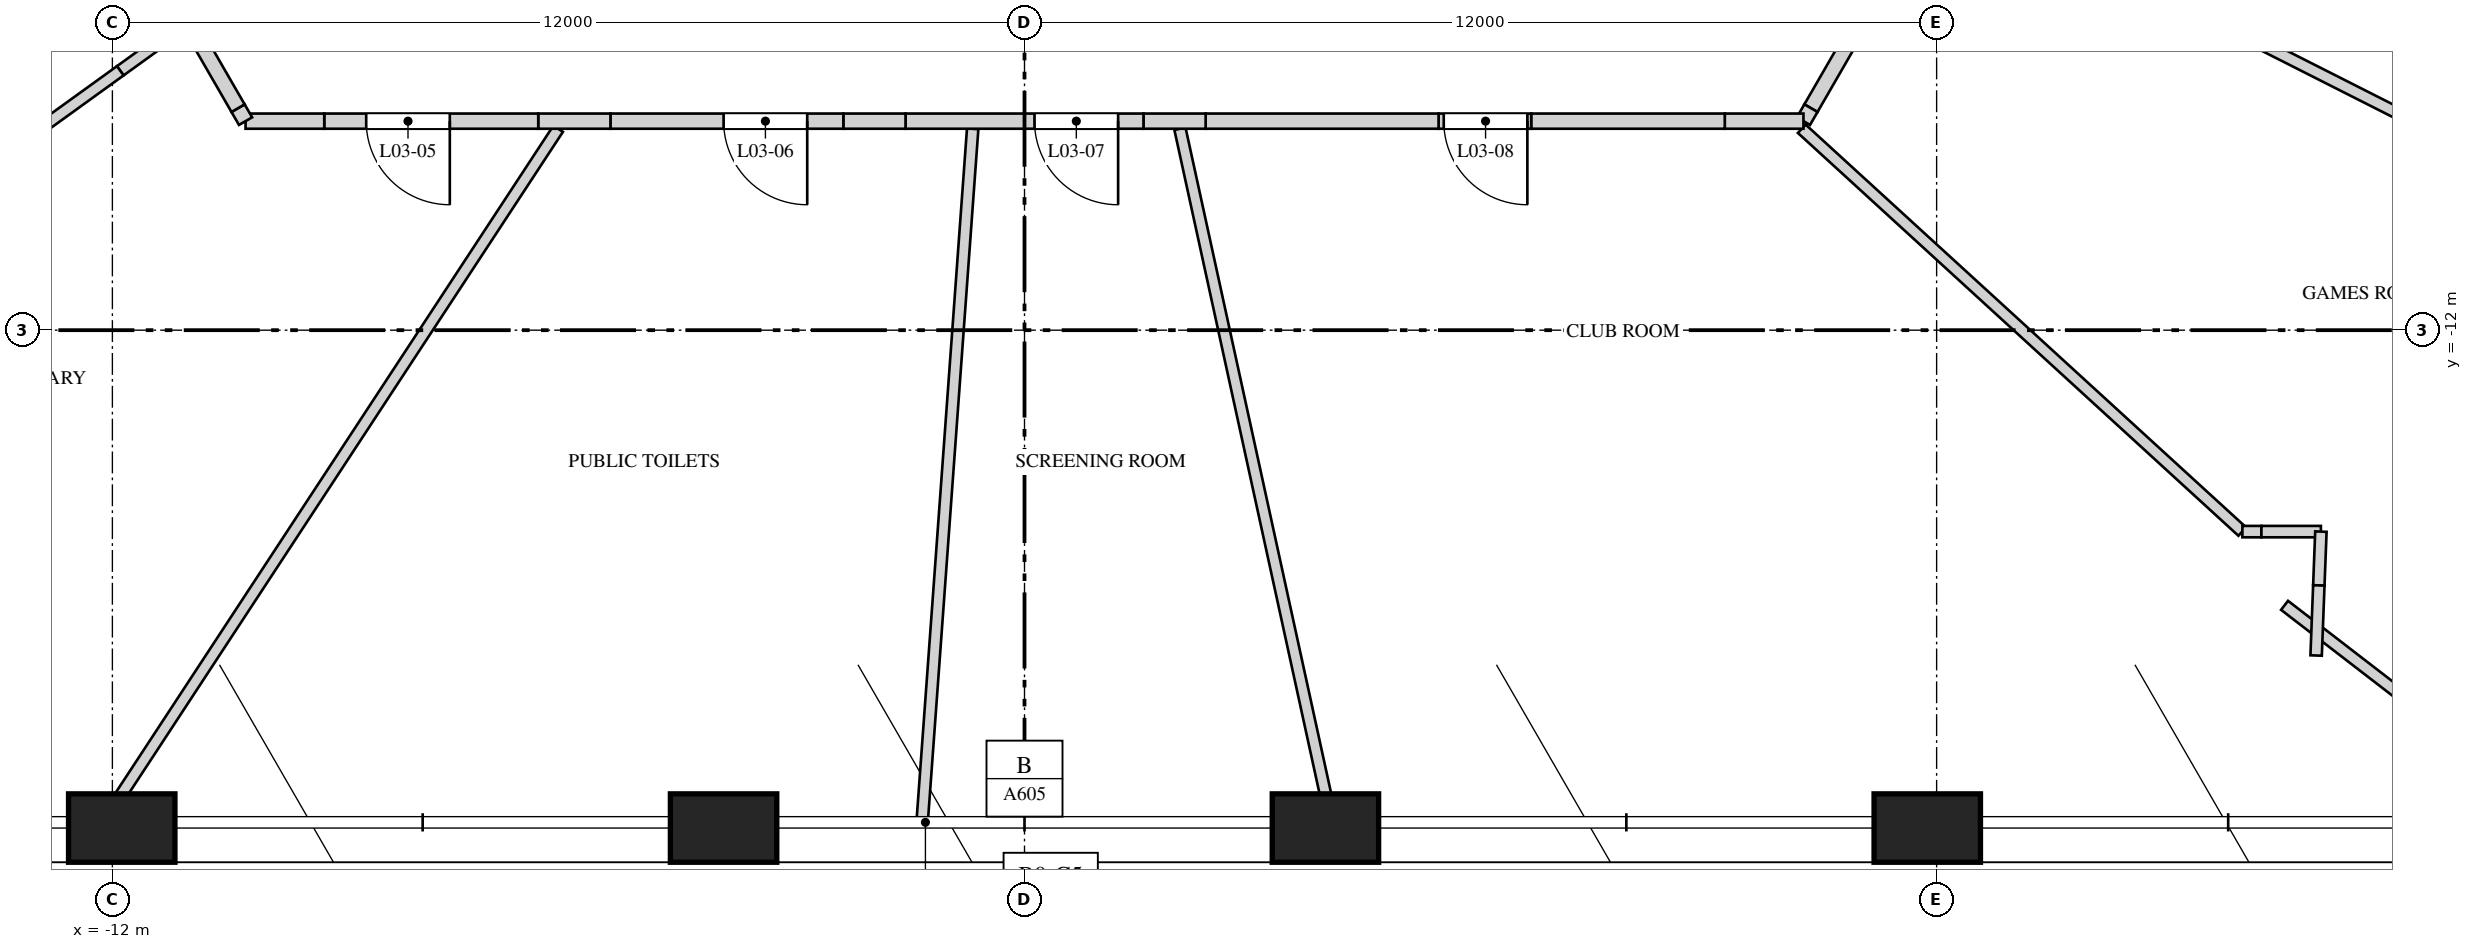
"""IFC4 building model, lengths in metres.
Left out: names, types, materials, properties, quantities, classifications, styles, units other than length and angle.
Written with IfcOpenShell. Run it as: python <this file> out.ifc"""

import sys

from ifc_helpers import new_model, si_unit, direction, frame, frame_2d, origin, origin_2d, place, context, subcontext, project, spatial, polyline, rectangle, outline, extrude, element, fill, save


model = new_model("IFC4")
c1 = context("Model", 3, precision=1e-05, world=origin(), true_north=direction((0.0, 1.0)))
c2 = subcontext(c1, "Body", "Model", "MODEL_VIEW")
j1 = project(units=[si_unit("LENGTHUNIT", "METRE"), si_unit("PLANEANGLEUNIT", "RADIAN")], contexts=[c1])
p1 = place(None, origin())
s1 = spatial("IfcSite", under=j1, at=p1, CompositionType="ELEMENT")
p2 = place(p1, origin())
s2 = spatial("IfcBuilding", under=s1, at=p2, CompositionType="ELEMENT")
p3 = place(p2, frame((0.0, 0.0, 20.0)))
s3 = spatial("IfcBuildingStorey", under=s2, at=p3, CompositionType="ELEMENT", Elevation=20.0)
for number, where, z_axis, x_axis in (
    (1, (-11.877, -18.55, 0.0), (0.0, 0.0, 1.0), (1.0, 0.0, 0.0)),
    (2, (-3.959, -18.55, 0.0), (0.0, 0.0, 1.0), (1.0, 0.0, 0.0)),
    (3, (3.959, -18.55, 0.0), (0.0, 0.0, 1.0), (1.0, 0.0, 0.0)),
    (4, (11.877, -18.55, 0.0), (0.0, 0.0, 1.0), (1.0, 0.0, 0.0)),
):
    element("IfcColumn", number, at=place(p3, frame(where, z_axis=z_axis, x_axis=x_axis)), inside=s3, PredefinedType="COLUMN", context=c2, shape_type="SweptSolid", body=[
        extrude(rectangle(XDim=1.4, YDim=0.9, at=origin_2d()), origin(), (0.0, 0.0, 1.0), 5.0),
    ])
p4 = place(p3, frame((-11.084, -8.001, 0.0), z_axis=(0.0, 0.0, 1.0), x_axis=(-0.810724232581, -0.585428235316, 0.0)))
e5 = element("IfcWall", 5, at=p4, inside=s3, PredefinedType="PARTITIONING", context=c2, shape_type="SweptSolid", body=[
    extrude(rectangle(XDim=1.001, YDim=0.15, at=frame_2d((0.5, 0.0))), origin(), (0.0, 0.0, 1.0), 3.55),
])
p5 = place(p3, frame((-11.896, -8.588, 0.0), z_axis=(0.0, 0.0, 1.0), x_axis=(-0.810816646236, -0.585300235936, 0.0)))
e6 = element("IfcWall", 6, at=p5, inside=s3, PredefinedType="PARTITIONING", context=c2, shape_type="SweptSolid", body=[
    extrude(rectangle(XDim=16.816, YDim=0.15, at=frame_2d((8.408, 0.0))), origin(), (0.0, 0.0, 1.0), 4.65),
])
p6 = place(p3, frame((-6.135, -9.35, 0.0), z_axis=(0.0, 0.0, 1.0), x_axis=(-0.548631398355, -0.836064344856, 0.0)))
e7 = element("IfcWall", 7, at=p6, inside=s3, PredefinedType="PARTITIONING", context=c2, shape_type="SweptSolid", body=[
    extrude(rectangle(XDim=10.86, YDim=0.15, at=frame_2d((5.43, 0.0))), origin(), (0.0, 0.0, 1.0), 3.75),
])
p7 = place(p3, frame((-0.682, -9.35, 0.0), z_axis=(0.0, 0.0, 1.0), x_axis=(-0.072727761096, -0.997351829981, 0.0)))
e8 = element("IfcWall", 8, at=p7, inside=s3, PredefinedType="PARTITIONING", context=c2, shape_type="SweptSolid", body=[
    extrude(rectangle(XDim=9.104, YDim=0.15, at=frame_2d((4.552, 0.0))), origin(), (0.0, 0.0, 1.0), 4.65),
])
p8 = place(p3, frame((2.045, -9.35, 0.0), z_axis=(0.0, 0.0, 1.0), x_axis=(0.213683561591, -0.976902930442, 0.0)))
e9 = element("IfcWall", 9, at=p8, inside=s3, PredefinedType="PARTITIONING", context=c2, shape_type="SweptSolid", body=[
    extrude(rectangle(XDim=9.294, YDim=0.15, at=frame_2d((4.647, 0.0))), origin(), (0.0, 0.0, 1.0), 3.75),
])
p9 = place(p3, frame((10.226, -9.35, 0.0), z_axis=(0.0, 0.0, 1.0), x_axis=(0.738001386372, -0.674799195104, 0.0)))
e10 = element("IfcWall", 10, at=p9, inside=s3, PredefinedType="PARTITIONING", context=c2, shape_type="SweptSolid", body=[
    extrude(rectangle(XDim=7.853, YDim=0.15, at=frame_2d((3.927, 0.0))), origin(), (0.0, 0.0, 1.0), 3.55),
])
p10 = place(p3, frame((12.152, -6.152, 0.0), z_axis=(0.0, 0.0, 1.0), x_axis=(0.892189195248, -0.451661864542, 0.0)))
e11 = element("IfcWall", 11, at=p10, inside=s3, PredefinedType="PARTITIONING", context=c2, shape_type="SweptSolid", body=[
    extrude(rectangle(XDim=12.323, YDim=0.15, at=frame_2d((6.161, 0.0))), origin(), (0.0, 0.0, 1.0), 3.55),
])
p11 = place(p3, frame((16.023, -14.65, 0.0), z_axis=(0.0, 0.0, 1.0), x_axis=(1.0, 0.0, 0.0)))
e12 = element("IfcWall", 12, at=p11, inside=s3, PredefinedType="PARTITIONING", context=c2, shape_type="SweptSolid", body=[
    extrude(rectangle(XDim=0.25, YDim=0.15, at=frame_2d((0.125, 0.0))), origin(), (0.0, 0.0, 1.0), 3.55),
])
p12 = place(p3, frame((16.273, -14.65, 0.0), z_axis=(0.0, 0.0, 1.0), x_axis=(1.0, 0.0, 0.0)))
e13 = element("IfcWall", 13, at=p12, inside=s3, PredefinedType="PARTITIONING", context=c2, shape_type="SweptSolid", body=[
    extrude(rectangle(XDim=0.782, YDim=0.15, at=frame_2d((0.391, 0.0))), origin(), (0.0, 0.0, 1.0), 4.65),
])
p13 = place(p3, frame((16.577, -15.62, 0.0), z_axis=(0.0, 0.0, 1.0), x_axis=(0.79203798149, -0.610471814155, 0.0)))
e14 = element("IfcWall", 14, at=p13, inside=s3, PredefinedType="PARTITIONING", context=c2, shape_type="SweptSolid", body=[
    extrude(rectangle(XDim=4.603, YDim=0.15, at=frame_2d((2.301, 0.0))), origin(), (0.0, 0.0, 1.0), 3.55),
])
p14 = place(p3, frame((17.056, -14.65, 0.0), z_axis=(0.0, 0.0, 1.0), x_axis=(-0.038605211655, -0.999254540962, 0.0)))
e15 = element("IfcWall", 15, at=p14, inside=s3, PredefinedType="PARTITIONING", context=c2, shape_type="SweptSolid", body=[
    extrude(rectangle(XDim=0.708, YDim=0.15, at=frame_2d((0.354, 0.0))), origin(), (0.0, 0.0, 1.0), 4.65),
])
p15 = place(p3, frame((17.028, -15.358, 0.0), z_axis=(0.0, 0.0, 1.0), x_axis=(-0.038361998043, -0.999263907637, 0.0)))
e16 = element("IfcWall", 16, at=p15, inside=s3, PredefinedType="PARTITIONING", context=c2, shape_type="SweptSolid", body=[
    extrude(rectangle(XDim=0.923, YDim=0.15, at=frame_2d((0.461, 0.0))), origin(), (0.0, 0.0, 1.0), 3.55),
])
p16 = place(p3, frame((10.897, -8.125, 0.0), z_axis=(0.0, 0.0, 1.0), x_axis=(-0.499978356969, -0.866037899034, 0.0)))
e17 = element("IfcWall", 17, at=p16, inside=s3, PredefinedType="SOLIDWALL", context=c2, shape_type="SweptSolid", body=[
    extrude(rectangle(XDim=1.101, YDim=0.2, at=frame_2d((0.551, 0.0))), origin(), (0.0, 0.0, 1.0), 4.65),
])
p17 = place(p3, frame((10.347, -9.079, 0.0), z_axis=(0.0, 0.0, 1.0), x_axis=(-0.499865263774, -0.866103179807, 0.0)))
e18 = element("IfcWall", 18, at=p17, inside=s3, PredefinedType="SOLIDWALL", context=c2, shape_type="SweptSolid", body=[
    extrude(rectangle(XDim=0.197, YDim=0.2, at=frame_2d((0.099, 0.0))), origin(), (0.0, 0.0, 1.0), 3.55),
])
p18 = place(p3, frame((10.248, -9.25, 0.0), z_axis=(0.0, 0.0, 1.0), x_axis=(-1.0, 0.0, 0.0)))
e19 = element("IfcWall", 19, at=p18, inside=s3, PredefinedType="SOLIDWALL", context=c2, shape_type="SweptSolid", body=[
    extrude(rectangle(XDim=1.035, YDim=0.2, at=frame_2d((0.518, 0.0))), origin(), (0.0, 0.0, 1.0), 3.55),
])
p19 = place(p3, frame((9.213, -9.25, 0.0), z_axis=(0.0, 0.0, 1.0), x_axis=(-1.0, 0.0, 0.0)))
e20 = element("IfcWall", 20, at=p19, inside=s3, PredefinedType="SOLIDWALL", context=c2, shape_type="SweptSolid", body=[
    extrude(rectangle(XDim=2.547, YDim=0.2, at=frame_2d((1.273, 0.0))), origin(), (0.0, 0.0, 1.0), 4.65),
])
p20 = place(p3, frame((6.666, -9.25, 0.0), z_axis=(0.0, 0.0, 1.0), x_axis=(-1.0, 0.0, 0.0)))
e21 = element("IfcWall", 21, at=p20, inside=s3, PredefinedType="SOLIDWALL", context=c2, shape_type="SweptSolid", body=[
    extrude(outline(polyline([(0.0, 0.0), (1.218, 0.0), (1.218, 3.75), (0.268, 3.75), (0.268, 4.65), (0.0, 4.65), (0.0, 0.0)])), frame((0.0, 0.1, 0.0), z_axis=(0.0, -1.0, 0.0), x_axis=(1.0, 0.0, 0.0)), (0.0, 0.0, 1.0), 0.2),
])
p21 = place(p20, frame((0.05, 0.0, 0.0)))
e22 = element("IfcOpeningElement", 22, at=p21, cuts=e21, PredefinedType="OPENING", context=c2, shape_type="SweptSolid", body=[
    extrude(rectangle(XDim=1.1, YDim=2.4, at=frame_2d((0.55, 1.2))), frame((0.0, 0.11, 0.0), z_axis=(0.0, -1.0, 0.0), x_axis=(1.0, 0.0, 0.0)), (0.0, 0.0, 1.0), 0.22),
])
p22 = place(p3, frame((5.448, -9.25, 0.0), z_axis=(0.0, 0.0, 1.0), x_axis=(-1.0, 0.0, 0.0)))
e23 = element("IfcWall", 23, at=p22, inside=s3, PredefinedType="SOLIDWALL", context=c2, shape_type="SweptSolid", body=[
    extrude(rectangle(XDim=3.064, YDim=0.2, at=frame_2d((1.532, 0.0))), origin(), (0.0, 0.0, 1.0), 4.65),
])
p23 = place(p3, frame((2.383, -9.25, 0.0), z_axis=(0.0, 0.0, 1.0), x_axis=(-1.0, 0.0, 0.0)))
e24 = element("IfcWall", 24, at=p23, inside=s3, PredefinedType="SOLIDWALL", context=c2, shape_type="SweptSolid", body=[
    extrude(rectangle(XDim=0.818, YDim=0.2, at=frame_2d((0.409, 0.0))), origin(), (0.0, 0.0, 1.0), 3.75),
])
p24 = place(p3, frame((1.565, -9.25, 0.0), z_axis=(0.0, 0.0, 1.0), x_axis=(-1.0, 0.0, 0.0)))
e25 = element("IfcWall", 25, at=p24, inside=s3, PredefinedType="SOLIDWALL", context=c2, shape_type="SweptSolid", body=[
    extrude(rectangle(XDim=3.13, YDim=0.2, at=frame_2d((1.565, 0.0))), origin(), (0.0, 0.0, 1.0), 4.65),
])
p25 = place(p24, frame((0.333, 0.0, 0.0)))
e26 = element("IfcOpeningElement", 26, at=p25, cuts=e25, PredefinedType="OPENING", context=c2, shape_type="SweptSolid", body=[
    extrude(rectangle(XDim=1.1, YDim=2.4, at=frame_2d((0.55, 1.2))), frame((0.0, 0.11, 0.0), z_axis=(0.0, -1.0, 0.0), x_axis=(1.0, 0.0, 0.0)), (0.0, 0.0, 1.0), 0.22),
])
p26 = place(p3, frame((-1.565, -9.25, 0.0), z_axis=(0.0, 0.0, 1.0), x_axis=(-1.0, 0.0, 0.0)))
e27 = element("IfcWall", 27, at=p26, inside=s3, PredefinedType="SOLIDWALL", context=c2, shape_type="SweptSolid", body=[
    extrude(rectangle(XDim=0.818, YDim=0.2, at=frame_2d((0.409, 0.0))), origin(), (0.0, 0.0, 1.0), 3.75),
])
p27 = place(p3, frame((-2.383, -9.25, 0.0), z_axis=(0.0, 0.0, 1.0), x_axis=(-1.0, 0.0, 0.0)))
e28 = element("IfcWall", 28, at=p27, inside=s3, PredefinedType="SOLIDWALL", context=c2, shape_type="SweptSolid", body=[
    extrude(rectangle(XDim=3.064, YDim=0.2, at=frame_2d((1.532, 0.0))), origin(), (0.0, 0.0, 1.0), 4.65),
])
p28 = place(p27, frame((0.475, 0.0, 0.0)))
e29 = element("IfcOpeningElement", 29, at=p28, cuts=e28, PredefinedType="OPENING", context=c2, shape_type="SweptSolid", body=[
    extrude(rectangle(XDim=1.1, YDim=2.4, at=frame_2d((0.55, 1.2))), frame((0.0, 0.11, 0.0), z_axis=(0.0, -1.0, 0.0), x_axis=(1.0, 0.0, 0.0)), (0.0, 0.0, 1.0), 0.22),
])
p29 = place(p3, frame((-5.448, -9.25, 0.0), z_axis=(0.0, 0.0, 1.0), x_axis=(-1.0, 0.0, 0.0)))
e30 = element("IfcWall", 30, at=p29, inside=s3, PredefinedType="SOLIDWALL", context=c2, shape_type="SweptSolid", body=[
    extrude(rectangle(XDim=0.95, YDim=0.2, at=frame_2d((0.475, 0.0))), origin(), (0.0, 0.0, 1.0), 3.75),
])
p30 = place(p3, frame((-6.397, -9.25, 0.0), z_axis=(0.0, 0.0, 1.0), x_axis=(-1.0, 0.0, 0.0)))
e31 = element("IfcWall", 31, at=p30, inside=s3, PredefinedType="SOLIDWALL", context=c2, shape_type="SweptSolid", body=[
    extrude(rectangle(XDim=2.815, YDim=0.2, at=frame_2d((1.408, 0.0))), origin(), (0.0, 0.0, 1.0), 4.65),
])
p31 = place(p30, frame((1.163, 0.0, 0.0)))
e32 = element("IfcOpeningElement", 32, at=p31, cuts=e31, PredefinedType="OPENING", context=c2, shape_type="SweptSolid", body=[
    extrude(rectangle(XDim=1.1, YDim=2.4, at=frame_2d((0.55, 1.2))), frame((0.0, 0.11, 0.0), z_axis=(0.0, -1.0, 0.0), x_axis=(1.0, 0.0, 0.0)), (0.0, 0.0, 1.0), 0.22),
])
p32 = place(p3, frame((-9.213, -9.25, 0.0), z_axis=(0.0, 0.0, 1.0), x_axis=(-1.0, 0.0, 0.0)))
e33 = element("IfcWall", 33, at=p32, inside=s3, PredefinedType="SOLIDWALL", context=c2, shape_type="SweptSolid", body=[
    extrude(rectangle(XDim=1.035, YDim=0.2, at=frame_2d((0.518, 0.0))), origin(), (0.0, 0.0, 1.0), 3.55),
])
p33 = place(p3, frame((-10.248, -9.25, 0.0), z_axis=(0.0, 0.0, 1.0), x_axis=(-0.499865263774, 0.866103179807, 0.0)))
e34 = element("IfcWall", 34, at=p33, inside=s3, PredefinedType="SOLIDWALL", context=c2, shape_type="SweptSolid", body=[
    extrude(rectangle(XDim=0.197, YDim=0.2, at=frame_2d((0.099, 0.0))), origin(), (0.0, 0.0, 1.0), 3.55),
])
p34 = place(p3, frame((-10.347, -9.079, 0.0), z_axis=(0.0, 0.0, 1.0), x_axis=(-0.499911523785, 0.866076479525, 0.0)))
e35 = element("IfcWall", 35, at=p34, inside=s3, PredefinedType="SOLIDWALL", context=c2, shape_type="SweptSolid", body=[
    extrude(rectangle(XDim=1.267, YDim=0.2, at=frame_2d((0.633, 0.0))), origin(), (0.0, 0.0, 1.0), 4.65),
])
p35 = place(p31, origin())
e36 = element("IfcDoor", 36, at=p35, inside=s3, OperationType="SINGLE_SWING_LEFT", PredefinedType="DOOR", context=c2, shape_type="SweptSolid", body=[
    extrude(rectangle(XDim=1.1, YDim=2.4, at=frame_2d((0.55, 1.2))), frame((0.0, 0.025, 0.0), z_axis=(0.0, -1.0, 0.0), x_axis=(1.0, 0.0, 0.0)), (0.0, 0.0, 1.0), 0.05),
])
fill(e32, e36)
p36 = place(p28, origin())
e37 = element("IfcDoor", 37, at=p36, inside=s3, OperationType="SINGLE_SWING_RIGHT", PredefinedType="DOOR", context=c2, shape_type="SweptSolid", body=[
    extrude(rectangle(XDim=1.1, YDim=2.4, at=frame_2d((0.55, 1.2))), frame((0.0, 0.025, 0.0), z_axis=(0.0, -1.0, 0.0), x_axis=(1.0, 0.0, 0.0)), (0.0, 0.0, 1.0), 0.05),
])
fill(e29, e37)
p37 = place(p25, origin())
e38 = element("IfcDoor", 38, at=p37, inside=s3, OperationType="SINGLE_SWING_LEFT", PredefinedType="DOOR", context=c2, shape_type="SweptSolid", body=[
    extrude(rectangle(XDim=1.1, YDim=2.4, at=frame_2d((0.55, 1.2))), frame((0.0, 0.025, 0.0), z_axis=(0.0, -1.0, 0.0), x_axis=(1.0, 0.0, 0.0)), (0.0, 0.0, 1.0), 0.05),
])
fill(e26, e38)
p38 = place(p21, origin())
e39 = element("IfcDoor", 39, at=p38, inside=s3, OperationType="SINGLE_SWING_RIGHT", PredefinedType="DOOR", context=c2, shape_type="SweptSolid", body=[
    extrude(rectangle(XDim=1.1, YDim=2.4, at=frame_2d((0.55, 1.2))), frame((0.0, 0.025, 0.0), z_axis=(0.0, -1.0, 0.0), x_axis=(1.0, 0.0, 0.0)), (0.0, 0.0, 1.0), 0.05),
])
fill(e22, e39)
save(model, sys.argv[1])
